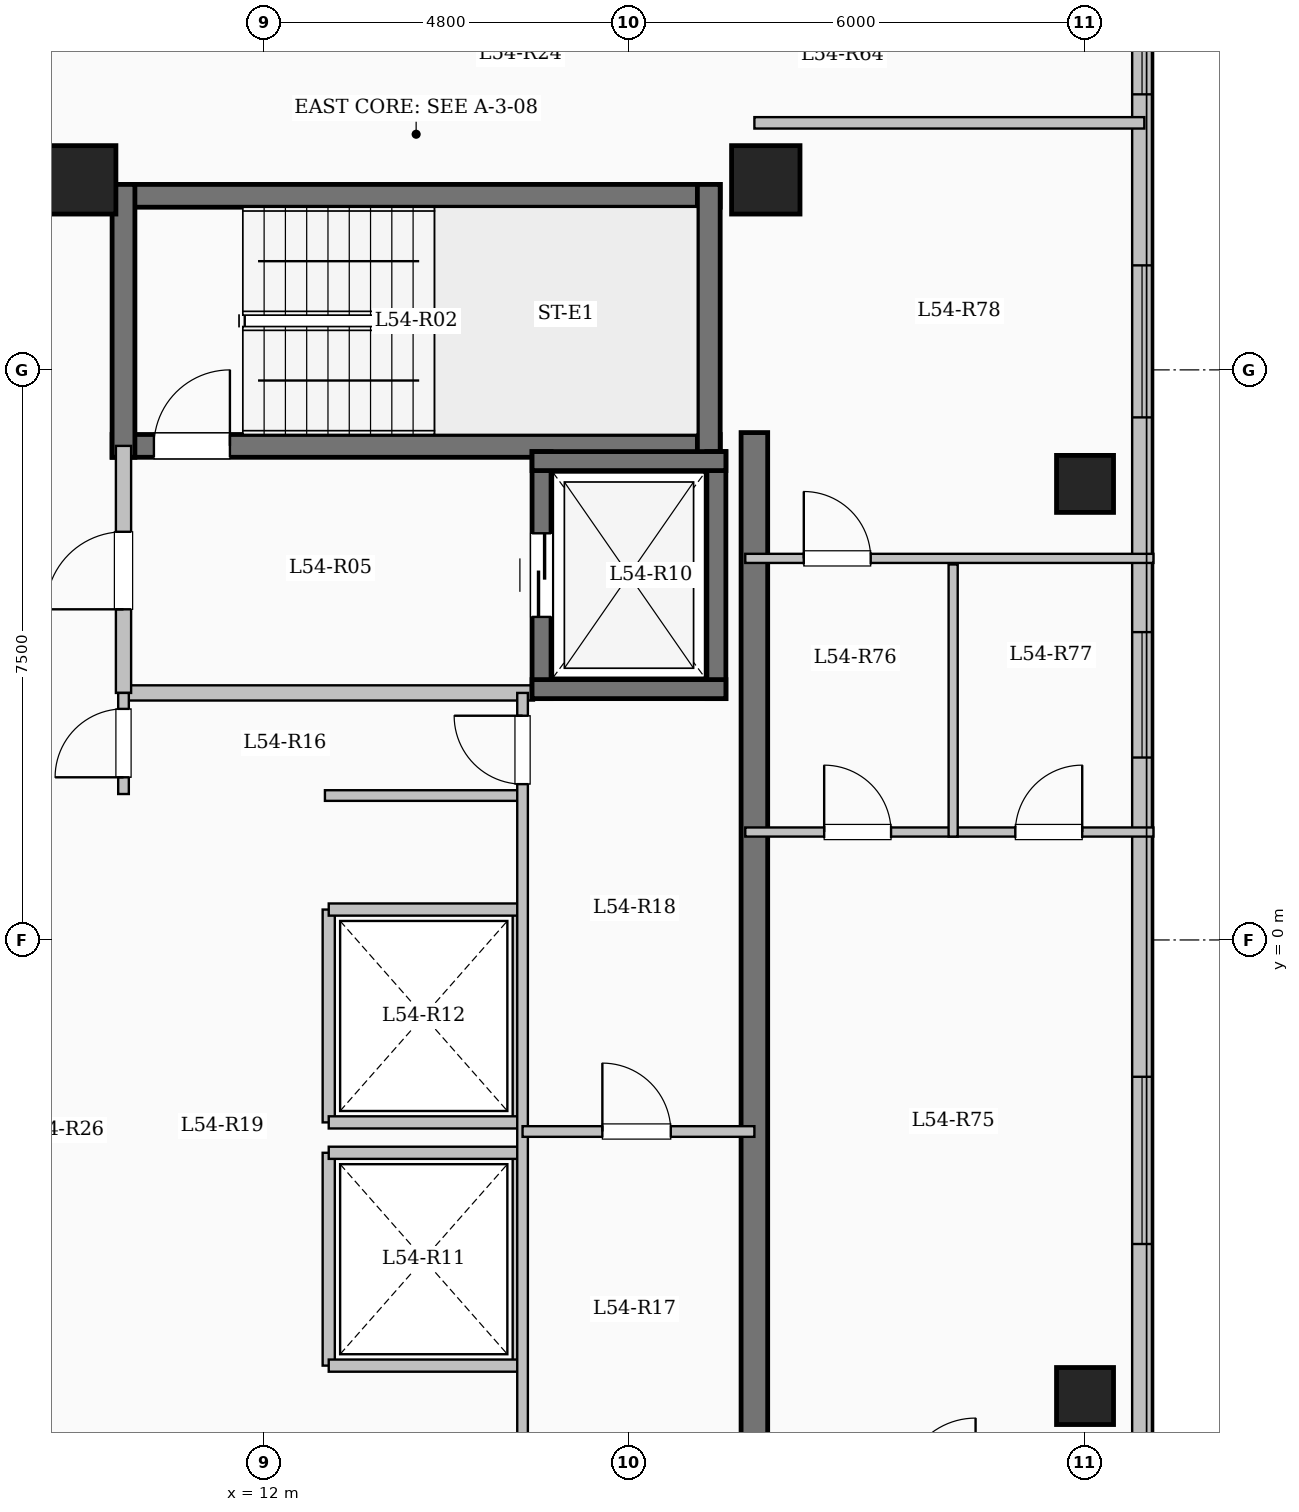
"""IFC4 building model, lengths in metres.
Left out: names, types, materials, properties, quantities, classifications, styles, units other than length and angle.
Written with IfcOpenShell. Run it as: python <this file> out.ifc"""

import sys

from ifc_helpers import new_model, si_unit, direction, frame, frame_2d, origin, origin_2d, place, context, subcontext, project, spatial, rectangle, extrude, element, fill, save


model = new_model("IFC4")
c1 = context("Model", 3, precision=1e-05, world=origin(), true_north=direction((0.0, 1.0)))
c2 = subcontext(c1, "Body", "Model", "MODEL_VIEW")
j1 = project(units=[si_unit("LENGTHUNIT", "METRE"), si_unit("PLANEANGLEUNIT", "RADIAN")], contexts=[c1])
p1 = place(None, origin())
s1 = spatial("IfcSite", under=j1, at=p1, CompositionType="ELEMENT")
p2 = place(p1, origin())
s2 = spatial("IfcBuilding", under=s1, at=p2, CompositionType="ELEMENT")
p3 = place(p2, frame((0.0, 0.0, 200.3)))
s3 = spatial("IfcBuildingStorey", under=s2, at=p3, CompositionType="ELEMENT", Elevation=200.3)
for number, where, z_axis, x_axis in (
    (1, (9.6, 10.0, 0.0), (0.0, 0.0, 1.0), (1.0, 0.0, 0.0)),
    (2, (18.6, 10.0, 0.0), (0.0, 0.0, 1.0), (1.0, 0.0, 0.0)),
):
    element("IfcColumn", number, at=place(p3, frame(where, z_axis=z_axis, x_axis=x_axis)), inside=s3, PredefinedType="COLUMN", context=c2, shape_type="SweptSolid", body=[
        extrude(rectangle(XDim=0.9, YDim=0.9, at=origin_2d()), origin(), (0.0, 0.0, 1.0), 3.35),
    ])
for number, where, z_axis, x_axis in (
    (3, (22.8, -6.0, 0.0), (0.0, 0.0, 1.0), (1.0, 0.0, 0.0)),
    (4, (22.8, 6.0, 0.0), (0.0, 0.0, 1.0), (1.0, 0.0, 0.0)),
):
    element("IfcColumn", number, at=place(p3, frame(where, z_axis=z_axis, x_axis=x_axis)), inside=s3, PredefinedType="COLUMN", context=c2, shape_type="SweptSolid", body=[
        extrude(rectangle(XDim=0.75, YDim=0.75, at=origin_2d()), origin(), (0.0, 0.0, 1.0), 3.35),
    ])
p4 = place(p3, frame((23.55, 17.25, 0.0), z_axis=(0.0, 0.0, 1.0), x_axis=(0.0, -1.0, 0.0)))
e5 = element("IfcWall", 5, at=p4, inside=s3, PredefinedType="SOLIDWALL", context=c2, shape_type="SweptSolid", body=[
    extrude(rectangle(XDim=34.5, YDim=0.26, at=frame_2d((17.25, 0.0))), origin(), (0.0, 0.0, 1.0), 3.1),
])
p5 = place(p4, frame((1.375, 0.0, 0.9)))
e6 = element("IfcOpeningElement", 6, at=p5, cuts=e5, PredefinedType="OPENING", context=c2, shape_type="SweptSolid", body=[
    extrude(rectangle(XDim=2.0, YDim=1.7, at=frame_2d((1.0, 0.85))), frame((0.0, 0.14, 0.0), z_axis=(0.0, -1.0, 0.0), x_axis=(1.0, 0.0, 0.0)), (0.0, 0.0, 1.0), 0.28),
])
p6 = place(p4, frame((5.125, 0.0, 0.95)))
e7 = element("IfcOpeningElement", 7, at=p6, cuts=e5, PredefinedType="OPENING", context=c2, shape_type="SweptSolid", body=[
    extrude(rectangle(XDim=1.0, YDim=1.5, at=frame_2d((0.5, 0.75))), frame((0.0, 0.14, 0.0), z_axis=(0.0, -1.0, 0.0), x_axis=(1.0, 0.0, 0.0)), (0.0, 0.0, 1.0), 0.28),
])
p7 = place(p4, frame((8.375, 0.0, 0.9)))
e8 = element("IfcOpeningElement", 8, at=p7, cuts=e5, PredefinedType="OPENING", context=c2, shape_type="SweptSolid", body=[
    extrude(rectangle(XDim=2.0, YDim=1.7, at=frame_2d((1.0, 0.85))), frame((0.0, 0.14, 0.0), z_axis=(0.0, -1.0, 0.0), x_axis=(1.0, 0.0, 0.0)), (0.0, 0.0, 1.0), 0.28),
])
p8 = place(p4, frame((13.2, 0.0, 0.9)))
e9 = element("IfcOpeningElement", 9, at=p8, cuts=e5, PredefinedType="OPENING", context=c2, shape_type="SweptSolid", body=[
    extrude(rectangle(XDim=1.65, YDim=1.6, at=frame_2d((0.825, 0.8))), frame((0.0, 0.14, 0.0), z_axis=(0.0, -1.0, 0.0), x_axis=(1.0, 0.0, 0.0)), (0.0, 0.0, 1.0), 0.28),
])
p9 = place(p4, frame((19.05, 0.0, 0.9)))
e10 = element("IfcOpeningElement", 10, at=p9, cuts=e5, PredefinedType="OPENING", context=c2, shape_type="SweptSolid", body=[
    extrude(rectangle(XDim=2.2, YDim=1.75, at=frame_2d((1.1, 0.875))), frame((0.0, 0.14, 0.0), z_axis=(0.0, -1.0, 0.0), x_axis=(1.0, 0.0, 0.0)), (0.0, 0.0, 1.0), 0.28),
])
p10 = place(p4, frame((24.975, 0.0, 0.95)))
e11 = element("IfcOpeningElement", 11, at=p10, cuts=e5, PredefinedType="OPENING", context=c2, shape_type="SweptSolid", body=[
    extrude(rectangle(XDim=1.2, YDim=1.5, at=frame_2d((0.6, 0.75))), frame((0.0, 0.14, 0.0), z_axis=(0.0, -1.0, 0.0), x_axis=(1.0, 0.0, 0.0)), (0.0, 0.0, 1.0), 0.28),
])
p11 = place(p4, frame((29.475, 0.0, 0.9)))
e12 = element("IfcOpeningElement", 12, at=p11, cuts=e5, PredefinedType="OPENING", context=c2, shape_type="SweptSolid", body=[
    extrude(rectangle(XDim=2.2, YDim=1.75, at=frame_2d((1.1, 0.875))), frame((0.0, 0.14, 0.0), z_axis=(0.0, -1.0, 0.0), x_axis=(1.0, 0.0, 0.0)), (0.0, 0.0, 1.0), 0.28),
])
p12 = place(p3, frame((10.0, 9.79, 0.0), z_axis=(0.0, 0.0, 1.0), x_axis=(1.0, 0.0, 0.0)))
e13 = element("IfcWall", 13, at=p12, inside=s3, PredefinedType="SHEAR", context=c2, shape_type="SweptSolid", body=[
    extrude(rectangle(XDim=8.0, YDim=0.3, at=frame_2d((4.0, 0.0))), origin(), (0.0, 0.0, 1.0), 3.35),
])
p13 = place(p3, frame((10.0, 6.5, 0.0), z_axis=(0.0, 0.0, 1.0), x_axis=(1.0, 0.0, 0.0)))
e14 = element("IfcWall", 14, at=p13, inside=s3, PredefinedType="SHEAR", context=c2, shape_type="SweptSolid", body=[
    extrude(rectangle(XDim=8.0, YDim=0.3, at=frame_2d((4.0, 0.0))), origin(), (0.0, 0.0, 1.0), 3.35),
])
p14 = place(p13, frame((0.55, 0.0, 0.0)))
e15 = element("IfcOpeningElement", 15, at=p14, cuts=e14, PredefinedType="OPENING", context=c2, shape_type="SweptSolid", body=[
    extrude(rectangle(XDim=1.0, YDim=2.15, at=frame_2d((0.5, 1.075))), frame((0.0, 0.16, 0.0), z_axis=(0.0, -1.0, 0.0), x_axis=(1.0, 0.0, 0.0)), (0.0, 0.0, 1.0), 0.32),
])
for number, where, z_axis, x_axis in (
    (16, (10.15, 6.35, 0.0), (0.0, 0.0, 1.0), (0.0, 1.0, 0.0)),
    (17, (17.85, 6.35, 0.0), (0.0, 0.0, 1.0), (0.0, 1.0, 0.0)),
):
    element("IfcWall", number, at=place(p3, frame(where, z_axis=z_axis, x_axis=x_axis)), inside=s3, PredefinedType="SHEAR", context=c2, shape_type="SweptSolid", body=[
        extrude(rectangle(XDim=3.59, YDim=0.3, at=frame_2d((1.795, 0.0))), origin(), (0.0, 0.0, 1.0), 3.35),
    ])
p15 = place(p3, frame((10.15, 3.25, 0.0), z_axis=(0.0, 0.0, 1.0), x_axis=(1.0, 0.0, 0.0)))
e18 = element("IfcWall", 18, at=p15, inside=s3, PredefinedType="SOLIDWALL", context=c2, shape_type="SweptSolid", body=[
    extrude(rectangle(XDim=5.4, YDim=0.2, at=frame_2d((2.7, 0.0))), origin(), (0.0, 0.0, 1.0), 3.1),
])
p16 = place(p3, frame((10.15, 3.25, 0.0), z_axis=(0.0, 0.0, 1.0), x_axis=(0.0, 1.0, 0.0)))
e19 = element("IfcWall", 19, at=p16, inside=s3, PredefinedType="SOLIDWALL", context=c2, shape_type="SweptSolid", body=[
    extrude(rectangle(XDim=3.25, YDim=0.2, at=frame_2d((1.625, 0.0))), origin(), (0.0, 0.0, 1.0), 3.1),
])
p17 = place(p16, frame((1.1, 0.0, 0.0)))
e20 = element("IfcOpeningElement", 20, at=p17, cuts=e19, PredefinedType="OPENING", context=c2, shape_type="SweptSolid", body=[
    extrude(rectangle(XDim=1.02, YDim=2.15, at=frame_2d((0.51, 1.075))), frame((0.0, 0.11, 0.0), z_axis=(0.0, -1.0, 0.0), x_axis=(1.0, 0.0, 0.0)), (0.0, 0.0, 1.0), 0.22),
])
p18 = place(p3, frame((15.65, 3.175, 0.0), z_axis=(0.0, 0.0, 1.0), x_axis=(0.0, 1.0, 0.0)))
e21 = element("IfcWall", 21, at=p18, inside=s3, PredefinedType="SHEAR", context=c2, shape_type="SweptSolid", body=[
    extrude(rectangle(XDim=3.25, YDim=0.25, at=frame_2d((1.625, 0.0))), origin(), (0.0, 0.0, 1.0), 3.35),
])
p19 = place(p18, frame((1.075, 0.0, 0.0)))
e22 = element("IfcOpeningElement", 22, at=p19, cuts=e21, PredefinedType="OPENING", context=c2, shape_type="SweptSolid", body=[
    extrude(rectangle(XDim=1.1, YDim=2.15, at=frame_2d((0.55, 1.075))), frame((0.0, 0.135, 0.0), z_axis=(0.0, -1.0, 0.0), x_axis=(1.0, 0.0, 0.0)), (0.0, 0.0, 1.0), 0.27),
])
p20 = place(p3, frame((17.95, 3.175, 0.0), z_axis=(0.0, 0.0, 1.0), x_axis=(0.0, 1.0, 0.0)))
e23 = element("IfcWall", 23, at=p20, inside=s3, PredefinedType="SHEAR", context=c2, shape_type="SweptSolid", body=[
    extrude(rectangle(XDim=3.25, YDim=0.25, at=frame_2d((1.625, 0.0))), origin(), (0.0, 0.0, 1.0), 3.35),
])
for number, where, z_axis, x_axis in (
    (24, (15.525, 3.3, 0.0), (0.0, 0.0, 1.0), (1.0, 0.0, 0.0)),
    (25, (15.525, 6.3, 0.0), (0.0, 0.0, 1.0), (1.0, 0.0, 0.0)),
):
    element("IfcWall", number, at=place(p3, frame(where, z_axis=z_axis, x_axis=x_axis)), inside=s3, PredefinedType="SHEAR", context=c2, shape_type="SweptSolid", body=[
        extrude(rectangle(XDim=2.55, YDim=0.25, at=frame_2d((1.275, 0.0))), origin(), (0.0, 0.0, 1.0), 3.35),
    ])
for number, where, z_axis, x_axis in (
    (26, (12.85, -5.6, 0.0), (0.0, 0.0, 1.0), (0.0, 1.0, 0.0)),
    (27, (15.35, -5.6, 0.0), (0.0, 0.0, 1.0), (0.0, 1.0, 0.0)),
):
    element("IfcWall", number, at=place(p3, frame(where, z_axis=z_axis, x_axis=x_axis)), inside=s3, PredefinedType="SOLIDWALL", context=c2, shape_type="SweptSolid", body=[
        extrude(rectangle(XDim=2.8, YDim=0.16, at=frame_2d((1.4, 0.0))), origin(), (0.0, 0.0, 1.0), 3.1),
    ])
for number, where, z_axis, x_axis in (
    (28, (12.85, -5.6, 0.0), (0.0, 0.0, 1.0), (1.0, 0.0, 0.0)),
    (29, (12.85, -2.8, 0.0), (0.0, 0.0, 1.0), (1.0, 0.0, 0.0)),
):
    element("IfcWall", number, at=place(p3, frame(where, z_axis=z_axis, x_axis=x_axis)), inside=s3, PredefinedType="SOLIDWALL", context=c2, shape_type="SweptSolid", body=[
        extrude(rectangle(XDim=2.5, YDim=0.16, at=frame_2d((1.25, 0.0))), origin(), (0.0, 0.0, 1.0), 3.1),
    ])
for number, where, z_axis, x_axis in (
    (30, (12.85, -2.4, 0.0), (0.0, 0.0, 1.0), (0.0, 1.0, 0.0)),
    (31, (15.35, -2.4, 0.0), (0.0, 0.0, 1.0), (0.0, 1.0, 0.0)),
):
    element("IfcWall", number, at=place(p3, frame(where, z_axis=z_axis, x_axis=x_axis)), inside=s3, PredefinedType="SOLIDWALL", context=c2, shape_type="SweptSolid", body=[
        extrude(rectangle(XDim=2.8, YDim=0.16, at=frame_2d((1.4, 0.0))), origin(), (0.0, 0.0, 1.0), 3.1),
    ])
for number, where, z_axis, x_axis in (
    (32, (12.85, -2.4, 0.0), (0.0, 0.0, 1.0), (1.0, 0.0, 0.0)),
    (33, (12.85, 0.4, 0.0), (0.0, 0.0, 1.0), (1.0, 0.0, 0.0)),
):
    element("IfcWall", number, at=place(p3, frame(where, z_axis=z_axis, x_axis=x_axis)), inside=s3, PredefinedType="SOLIDWALL", context=c2, shape_type="SweptSolid", body=[
        extrude(rectangle(XDim=2.5, YDim=0.16, at=frame_2d((1.25, 0.0))), origin(), (0.0, 0.0, 1.0), 3.1),
    ])
p21 = place(p3, frame((18.45, -7.375, 0.0), z_axis=(0.0, 0.0, 1.0), x_axis=(0.0, 1.0, 0.0)))
e34 = element("IfcWall", 34, at=p21, inside=s3, PredefinedType="SHEAR", context=c2, shape_type="SweptSolid", body=[
    extrude(rectangle(XDim=14.05, YDim=0.35, at=frame_2d((7.025, 0.0))), origin(), (0.0, 0.0, 1.0), 3.35),
])
p22 = place(p3, frame((12.8, 1.9, 0.0), z_axis=(0.0, 0.0, 1.0), x_axis=(1.0, 0.0, 0.0)))
e35 = element("IfcWall", 35, at=p22, inside=s3, PredefinedType="PARTITIONING", context=c2, shape_type="SweptSolid", body=[
    extrude(rectangle(XDim=2.6, YDim=0.14, at=frame_2d((1.3, 0.0))), origin(), (0.0, 0.0, 1.0), 3.1),
])
p23 = place(p3, frame((10.15, 1.92, 0.0), z_axis=(0.0, 0.0, 1.0), x_axis=(0.0, 1.0, 0.0)))
e36 = element("IfcWall", 36, at=p23, inside=s3, PredefinedType="PARTITIONING", context=c2, shape_type="SweptSolid", body=[
    extrude(rectangle(XDim=1.33, YDim=0.14, at=frame_2d((0.665, 0.0))), origin(), (0.0, 0.0, 1.0), 3.1),
])
p24 = place(p23, frame((0.22, 0.0, 0.0)))
e37 = element("IfcOpeningElement", 37, at=p24, cuts=e36, PredefinedType="OPENING", context=c2, shape_type="SweptSolid", body=[
    extrude(rectangle(XDim=0.9, YDim=2.08, at=frame_2d((0.45, 1.04))), frame((0.0, 0.08, 0.0), z_axis=(0.0, -1.0, 0.0), x_axis=(1.0, 0.0, 0.0)), (0.0, 0.0, 1.0), 0.16),
])
p25 = place(p3, frame((15.4, -7.2, 0.0), z_axis=(0.0, 0.0, 1.0), x_axis=(0.0, 1.0, 0.0)))
e38 = element("IfcWall", 38, at=p25, inside=s3, PredefinedType="PARTITIONING", context=c2, shape_type="SweptSolid", body=[
    extrude(rectangle(XDim=10.45, YDim=0.14, at=frame_2d((5.225, 0.0))), origin(), (0.0, 0.0, 1.0), 3.1),
])
p26 = place(p25, frame((9.25, 0.0, 0.0)))
e39 = element("IfcOpeningElement", 39, at=p26, cuts=e38, PredefinedType="OPENING", context=c2, shape_type="SweptSolid", body=[
    extrude(rectangle(XDim=0.9, YDim=2.08, at=frame_2d((0.45, 1.04))), frame((0.0, 0.08, 0.0), z_axis=(0.0, -1.0, 0.0), x_axis=(1.0, 0.0, 0.0)), (0.0, 0.0, 1.0), 0.16),
])
p27 = place(p3, frame((15.4, -2.52, 0.0), z_axis=(0.0, 0.0, 1.0), x_axis=(1.0, 0.0, 0.0)))
e40 = element("IfcWall", 40, at=p27, inside=s3, PredefinedType="PARTITIONING", context=c2, shape_type="SweptSolid", body=[
    extrude(rectangle(XDim=3.05, YDim=0.14, at=frame_2d((1.525, 0.0))), origin(), (0.0, 0.0, 1.0), 3.1),
])
p28 = place(p27, frame((1.05, 0.0, 0.0)))
e41 = element("IfcOpeningElement", 41, at=p28, cuts=e40, PredefinedType="OPENING", context=c2, shape_type="SweptSolid", body=[
    extrude(rectangle(XDim=0.9, YDim=2.08, at=frame_2d((0.45, 1.04))), frame((0.0, 0.08, 0.0), z_axis=(0.0, -1.0, 0.0), x_axis=(1.0, 0.0, 0.0)), (0.0, 0.0, 1.0), 0.16),
])
p29 = place(p3, frame((18.45, 10.75, 0.0), z_axis=(0.0, 0.0, 1.0), x_axis=(1.0, 0.0, 0.0)))
e42 = element("IfcWall", 42, at=p29, inside=s3, PredefinedType="PARTITIONING", context=c2, shape_type="SweptSolid", body=[
    extrude(rectangle(XDim=5.13, YDim=0.15, at=frame_2d((2.565, 0.0))), origin(), (0.0, 0.0, 1.0), 3.1),
])
p30 = place(p3, frame((18.33, 1.42, 0.0), z_axis=(0.0, 0.0, 1.0), x_axis=(1.0, 0.0, 0.0)))
e43 = element("IfcWall", 43, at=p30, inside=s3, PredefinedType="PARTITIONING", context=c2, shape_type="SweptSolid", body=[
    extrude(rectangle(XDim=5.37, YDim=0.12, at=frame_2d((2.685, 0.0))), origin(), (0.0, 0.0, 1.0), 3.1),
])
p31 = place(p30, frame((1.038, 0.0, 0.0)))
e44 = element("IfcOpeningElement", 44, at=p31, cuts=e43, PredefinedType="OPENING", context=c2, shape_type="SweptSolid", body=[
    extrude(rectangle(XDim=0.88, YDim=2.1, at=frame_2d((0.44, 1.05))), frame((0.0, 0.07, 0.0), z_axis=(0.0, -1.0, 0.0), x_axis=(1.0, 0.0, 0.0)), (0.0, 0.0, 1.0), 0.14),
])
p32 = place(p30, frame((3.553, 0.0, 0.0)))
e45 = element("IfcOpeningElement", 45, at=p32, cuts=e43, PredefinedType="OPENING", context=c2, shape_type="SweptSolid", body=[
    extrude(rectangle(XDim=0.88, YDim=2.1, at=frame_2d((0.44, 1.05))), frame((0.0, 0.07, 0.0), z_axis=(0.0, -1.0, 0.0), x_axis=(1.0, 0.0, 0.0)), (0.0, 0.0, 1.0), 0.14),
])
p33 = place(p3, frame((18.33, 5.02, 0.0), z_axis=(0.0, 0.0, 1.0), x_axis=(1.0, 0.0, 0.0)))
e46 = element("IfcWall", 46, at=p33, inside=s3, PredefinedType="PARTITIONING", context=c2, shape_type="SweptSolid", body=[
    extrude(rectangle(XDim=5.37, YDim=0.12, at=frame_2d((2.685, 0.0))), origin(), (0.0, 0.0, 1.0), 3.1),
])
p34 = place(p33, frame((0.77, 0.0, 0.0)))
e47 = element("IfcOpeningElement", 47, at=p34, cuts=e46, PredefinedType="OPENING", context=c2, shape_type="SweptSolid", body=[
    extrude(rectangle(XDim=0.88, YDim=2.1, at=frame_2d((0.44, 1.05))), frame((0.0, 0.07, 0.0), z_axis=(0.0, -1.0, 0.0), x_axis=(1.0, 0.0, 0.0)), (0.0, 0.0, 1.0), 0.14),
])
p35 = place(p3, frame((21.065, 1.36, 0.0), z_axis=(0.0, 0.0, 1.0), x_axis=(0.0, 1.0, 0.0)))
e48 = element("IfcWall", 48, at=p35, inside=s3, PredefinedType="PARTITIONING", context=c2, shape_type="SweptSolid", body=[
    extrude(rectangle(XDim=3.58, YDim=0.12, at=frame_2d((1.79, 0.0))), origin(), (0.0, 0.0, 1.0), 3.1),
])
p36 = place(p6, origin())
e49 = element("IfcWindow", 49, at=p36, inside=s3, PartitioningType="SINGLE_PANEL", PredefinedType="WINDOW", context=c2, shape_type="SweptSolid", body=[
    extrude(rectangle(XDim=1.0, YDim=1.5, at=frame_2d((0.5, 0.75))), frame((0.0, 0.03, 0.0), z_axis=(0.0, -1.0, 0.0), x_axis=(1.0, 0.0, 0.0)), (0.0, 0.0, 1.0), 0.06),
])
fill(e7, e49)
p37 = place(p7, origin())
e50 = element("IfcWindow", 50, at=p37, inside=s3, PartitioningType="SINGLE_PANEL", PredefinedType="WINDOW", context=c2, shape_type="SweptSolid", body=[
    extrude(rectangle(XDim=2.0, YDim=1.7, at=frame_2d((1.0, 0.85))), frame((0.0, 0.03, 0.0), z_axis=(0.0, -1.0, 0.0), x_axis=(1.0, 0.0, 0.0)), (0.0, 0.0, 1.0), 0.06),
])
fill(e8, e50)
p38 = place(p8, origin())
e51 = element("IfcWindow", 51, at=p38, inside=s3, PartitioningType="SINGLE_PANEL", PredefinedType="WINDOW", context=c2, shape_type="SweptSolid", body=[
    extrude(rectangle(XDim=1.65, YDim=1.6, at=frame_2d((0.825, 0.8))), frame((0.0, 0.03, 0.0), z_axis=(0.0, -1.0, 0.0), x_axis=(1.0, 0.0, 0.0)), (0.0, 0.0, 1.0), 0.06),
])
fill(e9, e51)
p39 = place(p9, origin())
e52 = element("IfcWindow", 52, at=p39, inside=s3, PartitioningType="SINGLE_PANEL", PredefinedType="WINDOW", context=c2, shape_type="SweptSolid", body=[
    extrude(rectangle(XDim=2.2, YDim=1.75, at=frame_2d((1.1, 0.875))), frame((0.0, 0.03, 0.0), z_axis=(0.0, -1.0, 0.0), x_axis=(1.0, 0.0, 0.0)), (0.0, 0.0, 1.0), 0.06),
])
fill(e10, e52)
p40 = place(p14, origin())
e53 = element("IfcDoor", 53, at=p40, inside=s3, OperationType="SINGLE_SWING_RIGHT", PredefinedType="DOOR", context=c2, shape_type="SweptSolid", body=[
    extrude(rectangle(XDim=1.0, YDim=2.15, at=frame_2d((0.5, 1.075))), frame((0.0, 0.025, 0.0), z_axis=(0.0, -1.0, 0.0), x_axis=(1.0, 0.0, 0.0)), (0.0, 0.0, 1.0), 0.05),
])
fill(e15, e53)
p41 = place(p17, origin())
e54 = element("IfcDoor", 54, at=p41, inside=s3, OperationType="SINGLE_SWING_LEFT", PredefinedType="DOOR", context=c2, shape_type="SweptSolid", body=[
    extrude(rectangle(XDim=1.02, YDim=2.15, at=frame_2d((0.51, 1.075))), frame((0.0, 0.025, 0.0), z_axis=(0.0, -1.0, 0.0), x_axis=(1.0, 0.0, 0.0)), (0.0, 0.0, 1.0), 0.05),
])
fill(e20, e54)
p42 = place(p19, origin())
e55 = element("IfcDoor", 55, at=p42, inside=s3, OperationType="SLIDING_TO_LEFT", PredefinedType="DOOR", context=c2, shape_type="SweptSolid", body=[
    extrude(rectangle(XDim=1.1, YDim=2.15, at=frame_2d((0.55, 1.075))), frame((0.0, 0.025, 0.0), z_axis=(0.0, -1.0, 0.0), x_axis=(1.0, 0.0, 0.0)), (0.0, 0.0, 1.0), 0.05),
])
fill(e22, e55)
p43 = place(p24, origin())
e56 = element("IfcDoor", 56, at=p43, inside=s3, OperationType="SINGLE_SWING_LEFT", PredefinedType="DOOR", context=c2, shape_type="SweptSolid", body=[
    extrude(rectangle(XDim=0.9, YDim=2.08, at=frame_2d((0.45, 1.04))), frame((0.0, 0.025, 0.0), z_axis=(0.0, -1.0, 0.0), x_axis=(1.0, 0.0, 0.0)), (0.0, 0.0, 1.0), 0.05),
])
fill(e37, e56)
p44 = place(p26, origin())
e57 = element("IfcDoor", 57, at=p44, inside=s3, OperationType="SINGLE_SWING_RIGHT", PredefinedType="DOOR", context=c2, shape_type="SweptSolid", body=[
    extrude(rectangle(XDim=0.9, YDim=2.08, at=frame_2d((0.45, 1.04))), frame((0.0, 0.025, 0.0), z_axis=(0.0, -1.0, 0.0), x_axis=(1.0, 0.0, 0.0)), (0.0, 0.0, 1.0), 0.05),
])
fill(e39, e57)
p45 = place(p28, origin())
e58 = element("IfcDoor", 58, at=p45, inside=s3, OperationType="SINGLE_SWING_LEFT", PredefinedType="DOOR", context=c2, shape_type="SweptSolid", body=[
    extrude(rectangle(XDim=0.9, YDim=2.08, at=frame_2d((0.45, 1.04))), frame((0.0, 0.025, 0.0), z_axis=(0.0, -1.0, 0.0), x_axis=(1.0, 0.0, 0.0)), (0.0, 0.0, 1.0), 0.05),
])
fill(e41, e58)
p46 = place(p31, origin())
e59 = element("IfcDoor", 59, at=p46, inside=s3, OperationType="SINGLE_SWING_LEFT", PredefinedType="DOOR", context=c2, shape_type="SweptSolid", body=[
    extrude(rectangle(XDim=0.88, YDim=2.1, at=frame_2d((0.44, 1.05))), frame((0.0, 0.025, 0.0), z_axis=(0.0, -1.0, 0.0), x_axis=(1.0, 0.0, 0.0)), (0.0, 0.0, 1.0), 0.05),
])
fill(e44, e59)
p47 = place(p32, origin())
e60 = element("IfcDoor", 60, at=p47, inside=s3, OperationType="SINGLE_SWING_RIGHT", PredefinedType="DOOR", context=c2, shape_type="SweptSolid", body=[
    extrude(rectangle(XDim=0.88, YDim=2.1, at=frame_2d((0.44, 1.05))), frame((0.0, 0.025, 0.0), z_axis=(0.0, -1.0, 0.0), x_axis=(1.0, 0.0, 0.0)), (0.0, 0.0, 1.0), 0.05),
])
fill(e45, e60)
p48 = place(p34, origin())
e61 = element("IfcDoor", 61, at=p48, inside=s3, OperationType="SINGLE_SWING_LEFT", PredefinedType="DOOR", context=c2, shape_type="SweptSolid", body=[
    extrude(rectangle(XDim=0.88, YDim=2.1, at=frame_2d((0.44, 1.05))), frame((0.0, 0.025, 0.0), z_axis=(0.0, -1.0, 0.0), x_axis=(1.0, 0.0, 0.0)), (0.0, 0.0, 1.0), 0.05),
])
fill(e47, e61)
save(model, sys.argv[1])
